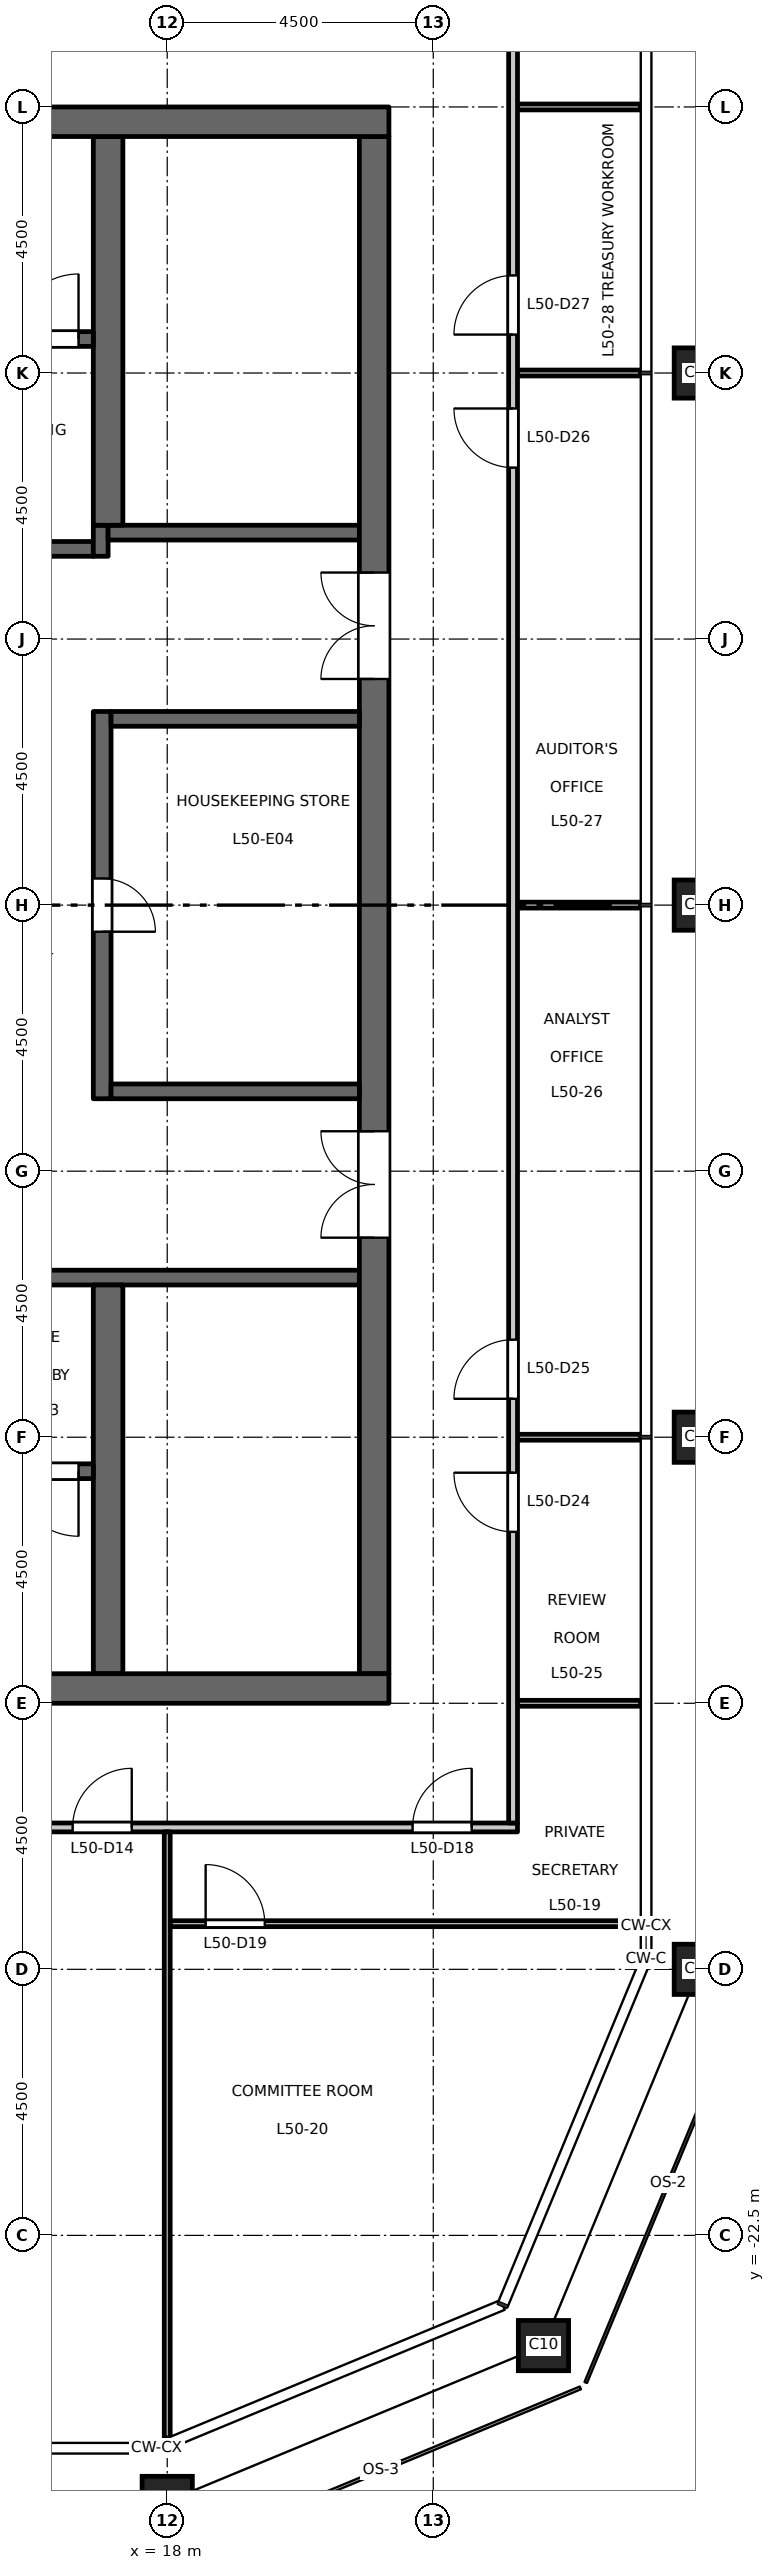
"""IFC4 building model, lengths in metres.
Left out: names, types, materials, properties, quantities, classifications, styles, units other than length and angle.
Written with IfcOpenShell. Run it as: python <this file> out.ifc"""

import sys

from ifc_helpers import new_model, si_unit, direction, frame, frame_2d, origin, origin_2d, place, context, subcontext, project, spatial, rectangle, hollow_rectangle, extrude, element, fill, save


model = new_model("IFC4")
c1 = context("Model", 3, precision=1e-05, world=origin(), true_north=direction((0.0, 1.0)))
c2 = subcontext(c1, "Body", "Model", "MODEL_VIEW")
j1 = project(units=[si_unit("LENGTHUNIT", "METRE"), si_unit("PLANEANGLEUNIT", "RADIAN")], contexts=[c1])
p1 = place(None, origin())
s1 = spatial("IfcSite", under=j1, at=p1, CompositionType="ELEMENT")
p2 = place(p1, origin())
s2 = spatial("IfcBuilding", under=s1, at=p2, CompositionType="ELEMENT")
p3 = place(p2, frame((0.0, 0.0, 233.2)))
s3 = spatial("IfcBuildingStorey", under=s2, at=p3, CompositionType="ELEMENT", Elevation=233.2)
for number, where, z_axis, x_axis in (
    (1, (18.0, -27.0, 0.0), (0.0, 0.0, 1.0), (1.0, 0.0, 0.0)),
    (2, (24.364, -24.364, 0.0), (0.0, 0.0, 1.0), (1.0, 0.0, 0.0)),
    (3, (27.0, -18.0, 0.0), (0.0, 0.0, 1.0), (1.0, 0.0, 0.0)),
    (4, (27.0, -9.0, 0.0), (0.0, 0.0, 1.0), (1.0, 0.0, 0.0)),
    (5, (27.0, 0.0, 0.0), (0.0, 0.0, 1.0), (1.0, 0.0, 0.0)),
    (6, (27.0, 9.0, 0.0), (0.0, 0.0, 1.0), (1.0, 0.0, 0.0)),
):
    element("IfcColumn", number, at=place(p3, frame(where, z_axis=z_axis, x_axis=x_axis)), inside=s3, PredefinedType="COLUMN", context=c2, shape_type="SweptSolid", body=[
        extrude(hollow_rectangle(XDim=0.85, YDim=0.85, WallThickness=0.05, at=origin_2d()), origin(), (0.0, 0.0, 1.0), 4.5),
    ])
p4 = place(p3, frame((12.15, 6.025, 0.0), z_axis=(0.0, 0.0, 1.0), x_axis=(1.0, 0.0, 0.0)))
e7 = element("IfcWall", 7, at=p4, inside=s3, PredefinedType="SHEAR", context=c2, shape_type="SweptSolid", body=[
    extrude(rectangle(XDim=4.6, YDim=0.25, at=frame_2d((2.3, 0.0))), origin(), (0.0, 0.0, 1.0), 4.35),
])
p5 = place(p4, frame((1.8, 0.0, 0.0)))
e8 = element("IfcOpeningElement", 8, at=p5, cuts=e7, PredefinedType="OPENING", context=c2, shape_type="SweptSolid", body=[
    extrude(rectangle(XDim=1.0, YDim=2.1, at=frame_2d((0.5, 1.05))), frame((0.0, 0.135, 0.0), z_axis=(0.0, -1.0, 0.0), x_axis=(1.0, 0.0, 0.0)), (0.0, 0.0, 1.0), 0.27),
])
p6 = place(p3, frame((16.875, 5.9, 0.0), z_axis=(0.0, 0.0, 1.0), x_axis=(0.0, 1.0, 0.0)))
e9 = element("IfcWall", 9, at=p6, inside=s3, PredefinedType="SHEAR", context=c2, shape_type="SweptSolid", body=[
    extrude(rectangle(XDim=0.525, YDim=0.25, at=frame_2d((0.263, 0.0))), origin(), (0.0, 0.0, 1.0), 4.35),
])
p7 = place(p3, frame((17.0, 6.3, 0.0), z_axis=(0.0, 0.0, 1.0), x_axis=(1.0, 0.0, 0.0)))
e10 = element("IfcWall", 10, at=p7, inside=s3, PredefinedType="SHEAR", context=c2, shape_type="SweptSolid", body=[
    extrude(rectangle(XDim=4.25, YDim=0.25, at=frame_2d((2.125, 0.0))), origin(), (0.0, 0.0, 1.0), 4.35),
])
p8 = place(p3, frame((12.15, -6.3, 0.0), z_axis=(0.0, 0.0, 1.0), x_axis=(1.0, 0.0, 0.0)))
e11 = element("IfcWall", 11, at=p8, inside=s3, PredefinedType="SHEAR", context=c2, shape_type="SweptSolid", body=[
    extrude(rectangle(XDim=9.1, YDim=0.25, at=frame_2d((4.55, 0.0))), origin(), (0.0, 0.0, 1.0), 4.35),
])
p9 = place(p8, frame((1.8, 0.0, 0.0)))
e12 = element("IfcOpeningElement", 12, at=p9, cuts=e11, PredefinedType="OPENING", context=c2, shape_type="SweptSolid", body=[
    extrude(rectangle(XDim=1.0, YDim=2.1, at=frame_2d((0.5, 1.05))), frame((0.0, 0.135, 0.0), z_axis=(0.0, -1.0, 0.0), x_axis=(1.0, 0.0, 0.0)), (0.0, 0.0, 1.0), 0.27),
])
p10 = place(p3, frame((21.5, -13.0, 0.0), z_axis=(0.0, 0.0, 1.0), x_axis=(0.0, 1.0, 0.0)))
e13 = element("IfcWall", 13, at=p10, inside=s3, PredefinedType="SHEAR", context=c2, shape_type="SweptSolid", body=[
    extrude(rectangle(XDim=26.0, YDim=0.5, at=frame_2d((13.0, 0.0))), origin(), (0.0, 0.0, 1.0), 4.35),
])
p11 = place(p10, frame((16.825, 0.0, 0.0)))
e14 = element("IfcOpeningElement", 14, at=p11, cuts=e13, PredefinedType="OPENING", context=c2, shape_type="SweptSolid", body=[
    extrude(rectangle(XDim=1.8, YDim=2.1, at=frame_2d((0.9, 1.05))), frame((0.0, 0.26, 0.0), z_axis=(0.0, -1.0, 0.0), x_axis=(1.0, 0.0, 0.0)), (0.0, 0.0, 1.0), 0.52),
])
p12 = place(p10, frame((7.375, 0.0, 0.0)))
e15 = element("IfcOpeningElement", 15, at=p12, cuts=e13, PredefinedType="OPENING", context=c2, shape_type="SweptSolid", body=[
    extrude(rectangle(XDim=1.8, YDim=2.1, at=frame_2d((0.9, 1.05))), frame((0.0, 0.26, 0.0), z_axis=(0.0, -1.0, 0.0), x_axis=(1.0, 0.0, 0.0)), (0.0, 0.0, 1.0), 0.52),
])
p13 = place(p3, frame((16.9, -3.275, 0.0), z_axis=(0.0, 0.0, 1.0), x_axis=(0.0, 1.0, 0.0)))
e16 = element("IfcWall", 16, at=p13, inside=s3, PredefinedType="SHEAR", context=c2, shape_type="SweptSolid", body=[
    extrude(rectangle(XDim=6.55, YDim=0.3, at=frame_2d((3.275, 0.0))), origin(), (0.0, 0.0, 1.0), 4.35),
])
p14 = place(p13, frame((2.825, 0.0, 0.0)))
e17 = element("IfcOpeningElement", 17, at=p14, cuts=e16, PredefinedType="OPENING", context=c2, shape_type="SweptSolid", body=[
    extrude(rectangle(XDim=0.9, YDim=2.1, at=frame_2d((0.45, 1.05))), frame((0.0, 0.16, 0.0), z_axis=(0.0, -1.0, 0.0), x_axis=(1.0, 0.0, 0.0)), (0.0, 0.0, 1.0), 0.32),
])
for number, where, z_axis, x_axis in (
    (18, (17.05, 3.15, 0.0), (0.0, 0.0, 1.0), (1.0, 0.0, 0.0)),
    (19, (17.05, -3.15, 0.0), (0.0, 0.0, 1.0), (1.0, 0.0, 0.0)),
):
    element("IfcWall", number, at=place(p3, frame(where, z_axis=z_axis, x_axis=x_axis)), inside=s3, PredefinedType="SHEAR", context=c2, shape_type="SweptSolid", body=[
        extrude(rectangle(XDim=4.2, YDim=0.25, at=frame_2d((2.1, 0.0))), origin(), (0.0, 0.0, 1.0), 4.35),
    ])
for number, where, z_axis, x_axis in (
    (20, (17.0, 6.425, 0.0), (0.0, 0.0, 1.0), (0.0, 1.0, 0.0)),
    (21, (17.0, -13.0, 0.0), (0.0, 0.0, 1.0), (0.0, 1.0, 0.0)),
):
    element("IfcWall", number, at=place(p3, frame(where, z_axis=z_axis, x_axis=x_axis)), inside=s3, PredefinedType="SHEAR", context=c2, shape_type="SweptSolid", body=[
        extrude(rectangle(XDim=6.575, YDim=0.5, at=frame_2d((3.288, 0.0))), origin(), (0.0, 0.0, 1.0), 4.35),
    ])
p15 = place(p3, frame((8.75, 9.575, 0.0), z_axis=(0.0, 0.0, 1.0), x_axis=(1.0, 0.0, 0.0)))
e22 = element("IfcWall", 22, at=p15, inside=s3, PredefinedType="SHEAR", context=c2, shape_type="SweptSolid", body=[
    extrude(rectangle(XDim=8.0, YDim=0.25, at=frame_2d((4.0, 0.0))), origin(), (0.0, 0.0, 1.0), 4.35),
])
p16 = place(p15, frame((6.65, 0.0, 0.0)))
e23 = element("IfcOpeningElement", 23, at=p16, cuts=e22, PredefinedType="OPENING", context=c2, shape_type="SweptSolid", body=[
    extrude(rectangle(XDim=1.1, YDim=2.1, at=frame_2d((0.55, 1.05))), frame((0.0, 0.135, 0.0), z_axis=(0.0, -1.0, 0.0), x_axis=(1.0, 0.0, 0.0)), (0.0, 0.0, 1.0), 0.27),
])
p17 = place(p3, frame((8.75, -9.575, 0.0), z_axis=(0.0, 0.0, 1.0), x_axis=(1.0, 0.0, 0.0)))
e24 = element("IfcWall", 24, at=p17, inside=s3, PredefinedType="SHEAR", context=c2, shape_type="SweptSolid", body=[
    extrude(rectangle(XDim=8.0, YDim=0.25, at=frame_2d((4.0, 0.0))), origin(), (0.0, 0.0, 1.0), 4.35),
])
p18 = place(p17, frame((6.65, 0.0, 0.0)))
e25 = element("IfcOpeningElement", 25, at=p18, cuts=e24, PredefinedType="OPENING", context=c2, shape_type="SweptSolid", body=[
    extrude(rectangle(XDim=1.1, YDim=2.1, at=frame_2d((0.55, 1.05))), frame((0.0, 0.135, 0.0), z_axis=(0.0, -1.0, 0.0), x_axis=(1.0, 0.0, 0.0)), (0.0, 0.0, 1.0), 0.27),
])
for number, where, z_axis, x_axis in (
    (26, (8.25, 13.25, 0.0), (0.0, 0.0, 1.0), (1.0, 0.0, 0.0)),
    (27, (8.25, -13.25, 0.0), (0.0, 0.0, 1.0), (1.0, 0.0, 0.0)),
):
    element("IfcWall", number, at=place(p3, frame(where, z_axis=z_axis, x_axis=x_axis)), inside=s3, PredefinedType="SHEAR", context=c2, shape_type="SweptSolid", body=[
        extrude(rectangle(XDim=13.5, YDim=0.5, at=frame_2d((6.75, 0.0))), origin(), (0.0, 0.0, 1.0), 4.35),
    ])
p19 = place(p3, frame((18.05, -17.228, 0.0), z_axis=(0.0, 0.0, 1.0), x_axis=(1.0, 0.0, 0.0)))
e28 = element("IfcWall", 28, at=p19, inside=s3, PredefinedType="PARTITIONING", context=c2, shape_type="SweptSolid", body=[
    extrude(rectangle(XDim=7.96, YDim=0.1, at=frame_2d((3.98, 0.0))), origin(), (0.0, 0.0, 1.0), 4.35),
])
p20 = place(p19, frame((0.6, 0.0, 0.0)))
e29 = element("IfcOpeningElement", 29, at=p20, cuts=e28, PredefinedType="OPENING", context=c2, shape_type="SweptSolid", body=[
    extrude(rectangle(XDim=1.0, YDim=2.1, at=frame_2d((0.5, 1.05))), frame((0.0, 0.06, 0.0), z_axis=(0.0, -1.0, 0.0), x_axis=(1.0, 0.0, 0.0)), (0.0, 0.0, 1.0), 0.12),
])
p21 = place(p3, frame((-23.925, -15.6, 0.0), z_axis=(0.0, 0.0, 1.0), x_axis=(1.0, 0.0, 0.0)))
e30 = element("IfcWall", 30, at=p21, inside=s3, PredefinedType="PARTITIONING", context=c2, shape_type="SweptSolid", body=[
    extrude(rectangle(XDim=47.85, YDim=0.15, at=frame_2d((23.925, 0.0))), origin(), (0.0, 0.0, 1.0), 4.35),
])
p22 = place(p21, frame((6.575, 0.0, 0.0)))
e31 = element("IfcOpeningElement", 31, at=p22, cuts=e30, PredefinedType="OPENING", context=c2, shape_type="SweptSolid", body=[
    extrude(rectangle(XDim=1.0, YDim=2.1, at=frame_2d((0.5, 1.05))), frame((0.0, 0.085, 0.0), z_axis=(0.0, -1.0, 0.0), x_axis=(1.0, 0.0, 0.0)), (0.0, 0.0, 1.0), 0.17),
])
p23 = place(p21, frame((15.575, 0.0, 0.0)))
e32 = element("IfcOpeningElement", 32, at=p23, cuts=e30, PredefinedType="OPENING", context=c2, shape_type="SweptSolid", body=[
    extrude(rectangle(XDim=1.0, YDim=2.1, at=frame_2d((0.5, 1.05))), frame((0.0, 0.085, 0.0), z_axis=(0.0, -1.0, 0.0), x_axis=(1.0, 0.0, 0.0)), (0.0, 0.0, 1.0), 0.17),
])
p24 = place(p21, frame((24.575, 0.0, 0.0)))
e33 = element("IfcOpeningElement", 33, at=p24, cuts=e30, PredefinedType="OPENING", context=c2, shape_type="SweptSolid", body=[
    extrude(rectangle(XDim=1.0, YDim=2.1, at=frame_2d((0.5, 1.05))), frame((0.0, 0.085, 0.0), z_axis=(0.0, -1.0, 0.0), x_axis=(1.0, 0.0, 0.0)), (0.0, 0.0, 1.0), 0.17),
])
p25 = place(p21, frame((40.325, 0.0, 0.0)))
e34 = element("IfcOpeningElement", 34, at=p25, cuts=e30, PredefinedType="OPENING", context=c2, shape_type="SweptSolid", body=[
    extrude(rectangle(XDim=1.0, YDim=2.1, at=frame_2d((0.5, 1.05))), frame((0.0, 0.085, 0.0), z_axis=(0.0, -1.0, 0.0), x_axis=(1.0, 0.0, 0.0)), (0.0, 0.0, 1.0), 0.17),
])
p26 = place(p21, frame((0.725, 0.0, 0.0)))
e35 = element("IfcOpeningElement", 35, at=p26, cuts=e30, PredefinedType="OPENING", context=c2, shape_type="SweptSolid", body=[
    extrude(rectangle(XDim=1.0, YDim=2.1, at=frame_2d((0.5, 1.05))), frame((0.0, 0.085, 0.0), z_axis=(0.0, -1.0, 0.0), x_axis=(1.0, 0.0, 0.0)), (0.0, 0.0, 1.0), 0.17),
])
p27 = place(p21, frame((46.075, 0.0, 0.0)))
e36 = element("IfcOpeningElement", 36, at=p27, cuts=e30, PredefinedType="OPENING", context=c2, shape_type="SweptSolid", body=[
    extrude(rectangle(XDim=1.0, YDim=2.1, at=frame_2d((0.5, 1.05))), frame((0.0, 0.085, 0.0), z_axis=(0.0, -1.0, 0.0), x_axis=(1.0, 0.0, 0.0)), (0.0, 0.0, 1.0), 0.17),
])
p28 = place(p3, frame((23.925, -13.5, 0.0), z_axis=(0.0, 0.0, 1.0), x_axis=(1.0, 0.0, 0.0)))
e37 = element("IfcWall", 37, at=p28, inside=s3, PredefinedType="PARTITIONING", context=c2, shape_type="SweptSolid", body=[
    extrude(rectangle(XDim=2.085, YDim=0.1, at=frame_2d((1.042, 0.0))), origin(), (0.0, 0.0, 1.0), 3.95),
])
for number, where, z_axis, x_axis in (
    (38, (23.925, -9.0, 0.0), (0.0, 0.0, 1.0), (1.0, 0.0, 0.0)),
    (39, (23.925, 0.0, 0.0), (0.0, 0.0, 1.0), (1.0, 0.0, 0.0)),
    (40, (23.925, 9.0, 0.0), (0.0, 0.0, 1.0), (1.0, 0.0, 0.0)),
    (41, (23.925, 13.5, 0.0), (0.0, 0.0, 1.0), (1.0, 0.0, 0.0)),
):
    element("IfcWall", number, at=place(p3, frame(where, z_axis=z_axis, x_axis=x_axis)), inside=s3, PredefinedType="PARTITIONING", context=c2, shape_type="SweptSolid", body=[
        extrude(rectangle(XDim=2.085, YDim=0.1, at=frame_2d((1.042, 0.0))), origin(), (0.0, 0.0, 1.0), 4.35),
    ])
p29 = place(p3, frame((18.0, -25.928, 0.0), z_axis=(0.0, 0.0, 1.0), x_axis=(0.0, 1.0, 0.0)))
e42 = element("IfcWall", 42, at=p29, inside=s3, PredefinedType="PARTITIONING", context=c2, shape_type="SweptSolid", body=[
    extrude(rectangle(XDim=10.253, YDim=0.1, at=frame_2d((5.126, 0.0))), origin(), (0.0, 0.0, 1.0), 3.65),
])
p30 = place(p3, frame((23.85, -15.525, 0.0), z_axis=(0.0, 0.0, 1.0), x_axis=(0.0, 1.0, 0.0)))
e43 = element("IfcWall", 43, at=p30, inside=s3, PredefinedType="PARTITIONING", context=c2, shape_type="SweptSolid", body=[
    extrude(rectangle(XDim=31.05, YDim=0.15, at=frame_2d((15.525, 0.0))), origin(), (0.0, 0.0, 1.0), 4.35),
])
p31 = place(p30, frame((4.925, 0.0, 0.0)))
e44 = element("IfcOpeningElement", 44, at=p31, cuts=e43, PredefinedType="OPENING", context=c2, shape_type="SweptSolid", body=[
    extrude(rectangle(XDim=1.0, YDim=2.1, at=frame_2d((0.5, 1.05))), frame((0.0, 0.085, 0.0), z_axis=(0.0, -1.0, 0.0), x_axis=(1.0, 0.0, 0.0)), (0.0, 0.0, 1.0), 0.17),
])
p32 = place(p30, frame((7.175, 0.0, 0.0)))
e45 = element("IfcOpeningElement", 45, at=p32, cuts=e43, PredefinedType="OPENING", context=c2, shape_type="SweptSolid", body=[
    extrude(rectangle(XDim=1.0, YDim=2.1, at=frame_2d((0.5, 1.05))), frame((0.0, 0.085, 0.0), z_axis=(0.0, -1.0, 0.0), x_axis=(1.0, 0.0, 0.0)), (0.0, 0.0, 1.0), 0.17),
])
p33 = place(p30, frame((22.925, 0.0, 0.0)))
e46 = element("IfcOpeningElement", 46, at=p33, cuts=e43, PredefinedType="OPENING", context=c2, shape_type="SweptSolid", body=[
    extrude(rectangle(XDim=1.0, YDim=2.1, at=frame_2d((0.5, 1.05))), frame((0.0, 0.085, 0.0), z_axis=(0.0, -1.0, 0.0), x_axis=(1.0, 0.0, 0.0)), (0.0, 0.0, 1.0), 0.17),
])
p34 = place(p30, frame((25.175, 0.0, 0.0)))
e47 = element("IfcOpeningElement", 47, at=p34, cuts=e43, PredefinedType="OPENING", context=c2, shape_type="SweptSolid", body=[
    extrude(rectangle(XDim=1.0, YDim=2.1, at=frame_2d((0.5, 1.05))), frame((0.0, 0.085, 0.0), z_axis=(0.0, -1.0, 0.0), x_axis=(1.0, 0.0, 0.0)), (0.0, 0.0, 1.0), 0.17),
])
p35 = place(p16, origin())
e48 = element("IfcDoor", 48, at=p35, inside=s3, OperationType="SINGLE_SWING_LEFT", PredefinedType="DOOR", context=c2, shape_type="SweptSolid", body=[
    extrude(rectangle(XDim=1.1, YDim=2.1, at=frame_2d((0.55, 1.05))), frame((0.0, 0.025, 0.0), z_axis=(0.0, -1.0, 0.0), x_axis=(1.0, 0.0, 0.0)), (0.0, 0.0, 1.0), 0.05),
])
fill(e23, e48)
p36 = place(p18, origin())
e49 = element("IfcDoor", 49, at=p36, inside=s3, OperationType="SINGLE_SWING_RIGHT", PredefinedType="DOOR", context=c2, shape_type="SweptSolid", body=[
    extrude(rectangle(XDim=1.1, YDim=2.1, at=frame_2d((0.55, 1.05))), frame((0.0, 0.025, 0.0), z_axis=(0.0, -1.0, 0.0), x_axis=(1.0, 0.0, 0.0)), (0.0, 0.0, 1.0), 0.05),
])
fill(e25, e49)
p37 = place(p11, origin())
e50 = element("IfcDoor", 50, at=p37, inside=s3, OperationType="DOUBLE_DOOR_DOUBLE_SWING", PredefinedType="DOOR", context=c2, shape_type="SweptSolid", body=[
    extrude(rectangle(XDim=1.8, YDim=2.1, at=frame_2d((0.9, 1.05))), frame((0.0, 0.025, 0.0), z_axis=(0.0, -1.0, 0.0), x_axis=(1.0, 0.0, 0.0)), (0.0, 0.0, 1.0), 0.05),
])
fill(e14, e50)
p38 = place(p12, origin())
e51 = element("IfcDoor", 51, at=p38, inside=s3, OperationType="DOUBLE_DOOR_DOUBLE_SWING", PredefinedType="DOOR", context=c2, shape_type="SweptSolid", body=[
    extrude(rectangle(XDim=1.8, YDim=2.1, at=frame_2d((0.9, 1.05))), frame((0.0, 0.025, 0.0), z_axis=(0.0, -1.0, 0.0), x_axis=(1.0, 0.0, 0.0)), (0.0, 0.0, 1.0), 0.05),
])
fill(e15, e51)
p39 = place(p14, origin())
e52 = element("IfcDoor", 52, at=p39, inside=s3, OperationType="SINGLE_SWING_LEFT", PredefinedType="DOOR", context=c2, shape_type="SweptSolid", body=[
    extrude(rectangle(XDim=0.9, YDim=2.1, at=frame_2d((0.45, 1.05))), frame((0.0, 0.025, 0.0), z_axis=(0.0, -1.0, 0.0), x_axis=(1.0, 0.0, 0.0)), (0.0, 0.0, 1.0), 0.05),
])
fill(e17, e52)
p40 = place(p25, origin())
e53 = element("IfcDoor", 53, at=p40, inside=s3, OperationType="SINGLE_SWING_RIGHT", PredefinedType="DOOR", context=c2, shape_type="SweptSolid", body=[
    extrude(rectangle(XDim=1.0, YDim=2.1, at=frame_2d((0.5, 1.05))), frame((0.0, 0.025, 0.0), z_axis=(0.0, -1.0, 0.0), x_axis=(1.0, 0.0, 0.0)), (0.0, 0.0, 1.0), 0.05),
])
fill(e34, e53)
p41 = place(p27, origin())
e54 = element("IfcDoor", 54, at=p41, inside=s3, OperationType="SINGLE_SWING_RIGHT", PredefinedType="DOOR", context=c2, shape_type="SweptSolid", body=[
    extrude(rectangle(XDim=1.0, YDim=2.1, at=frame_2d((0.5, 1.05))), frame((0.0, 0.025, 0.0), z_axis=(0.0, -1.0, 0.0), x_axis=(1.0, 0.0, 0.0)), (0.0, 0.0, 1.0), 0.05),
])
fill(e36, e54)
p42 = place(p20, origin())
e55 = element("IfcDoor", 55, at=p42, inside=s3, OperationType="SINGLE_SWING_LEFT", PredefinedType="DOOR", context=c2, shape_type="SweptSolid", body=[
    extrude(rectangle(XDim=1.0, YDim=2.1, at=frame_2d((0.5, 1.05))), frame((0.0, 0.025, 0.0), z_axis=(0.0, -1.0, 0.0), x_axis=(1.0, 0.0, 0.0)), (0.0, 0.0, 1.0), 0.05),
])
fill(e29, e55)
p43 = place(p31, origin())
e56 = element("IfcDoor", 56, at=p43, inside=s3, OperationType="SINGLE_SWING_RIGHT", PredefinedType="DOOR", context=c2, shape_type="SweptSolid", body=[
    extrude(rectangle(XDim=1.0, YDim=2.1, at=frame_2d((0.5, 1.05))), frame((0.0, 0.025, 0.0), z_axis=(0.0, -1.0, 0.0), x_axis=(1.0, 0.0, 0.0)), (0.0, 0.0, 1.0), 0.05),
])
fill(e44, e56)
p44 = place(p32, origin())
e57 = element("IfcDoor", 57, at=p44, inside=s3, OperationType="SINGLE_SWING_LEFT", PredefinedType="DOOR", context=c2, shape_type="SweptSolid", body=[
    extrude(rectangle(XDim=1.0, YDim=2.1, at=frame_2d((0.5, 1.05))), frame((0.0, 0.025, 0.0), z_axis=(0.0, -1.0, 0.0), x_axis=(1.0, 0.0, 0.0)), (0.0, 0.0, 1.0), 0.05),
])
fill(e45, e57)
p45 = place(p33, origin())
e58 = element("IfcDoor", 58, at=p45, inside=s3, OperationType="SINGLE_SWING_RIGHT", PredefinedType="DOOR", context=c2, shape_type="SweptSolid", body=[
    extrude(rectangle(XDim=1.0, YDim=2.1, at=frame_2d((0.5, 1.05))), frame((0.0, 0.025, 0.0), z_axis=(0.0, -1.0, 0.0), x_axis=(1.0, 0.0, 0.0)), (0.0, 0.0, 1.0), 0.05),
])
fill(e46, e58)
p46 = place(p34, origin())
e59 = element("IfcDoor", 59, at=p46, inside=s3, OperationType="SINGLE_SWING_LEFT", PredefinedType="DOOR", context=c2, shape_type="SweptSolid", body=[
    extrude(rectangle(XDim=1.0, YDim=2.1, at=frame_2d((0.5, 1.05))), frame((0.0, 0.025, 0.0), z_axis=(0.0, -1.0, 0.0), x_axis=(1.0, 0.0, 0.0)), (0.0, 0.0, 1.0), 0.05),
])
fill(e47, e59)
save(model, sys.argv[1])
